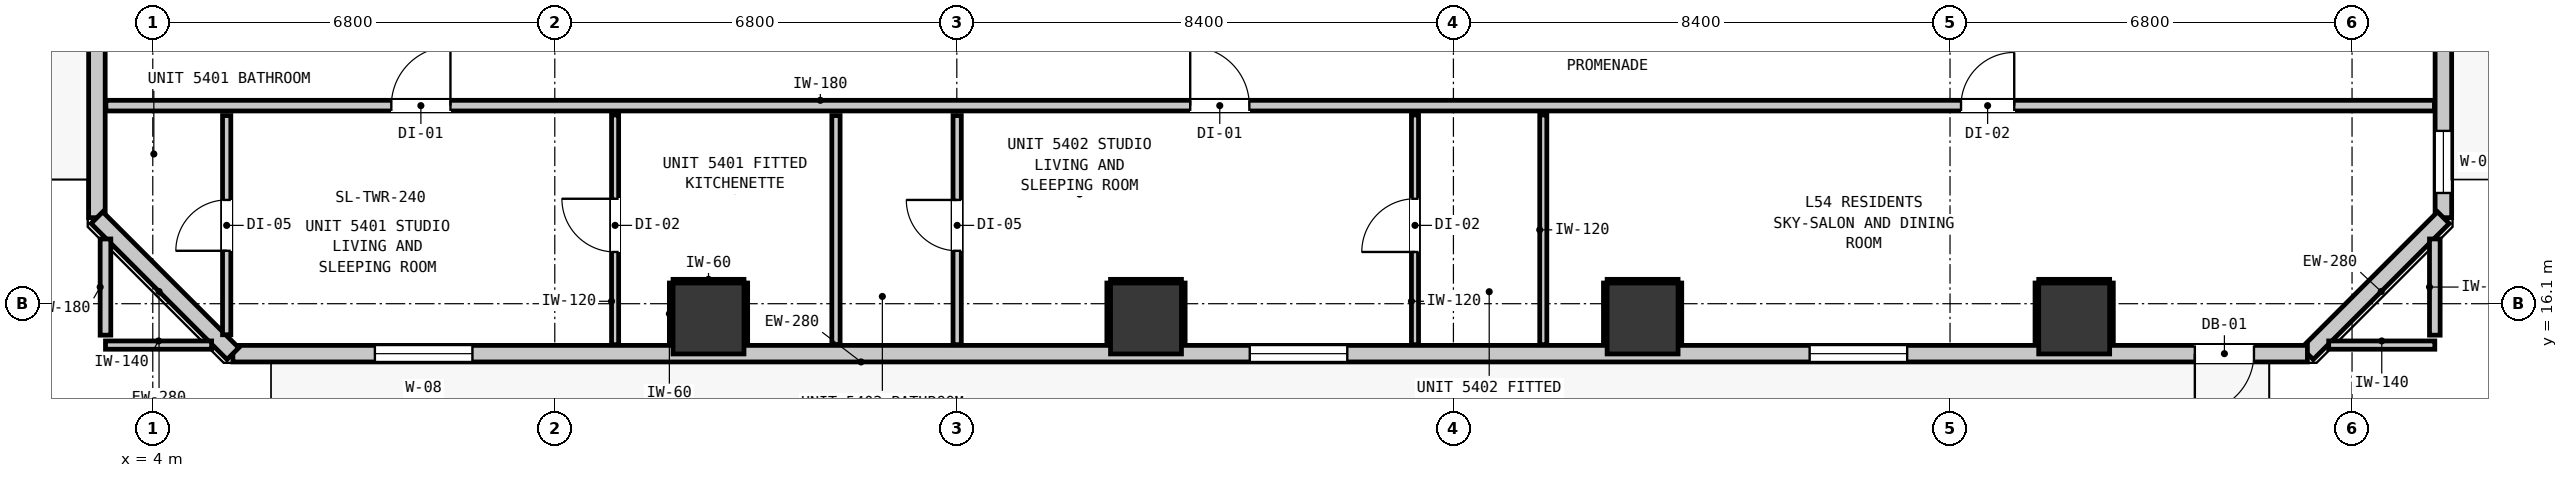
"""IFC4 building model, lengths in metres.
Left out: names, types, materials, properties, quantities, classifications, styles, units other than length and angle.
Written with IfcOpenShell. Run it as: python <this file> out.ifc"""

import sys

from ifc_helpers import new_model, si_unit, direction, frame, frame_2d, origin, origin_2d, place, context, subcontext, project, spatial, rectangle, extrude, element, fill, save


model = new_model("IFC4")
c1 = context("Model", 3, precision=1e-05, world=origin(), true_north=direction((0.0, 1.0)))
c2 = subcontext(c1, "Body", "Model", "MODEL_VIEW")
j1 = project(units=[si_unit("LENGTHUNIT", "METRE"), si_unit("PLANEANGLEUNIT", "RADIAN")], contexts=[c1])
p1 = place(None, origin())
s1 = spatial("IfcSite", under=j1, at=p1, CompositionType="ELEMENT")
p2 = place(p1, origin())
s2 = spatial("IfcBuilding", under=s1, at=p2, CompositionType="ELEMENT")
p3 = place(p2, frame((0.0, 0.0, 186.84)))
s3 = spatial("IfcBuildingStorey", under=s2, at=p3, CompositionType="ELEMENT", Elevation=186.84)
for number, where, z_axis, x_axis in (
    (1, (13.4, 15.85, 0.0), (0.0, 0.0, 1.0), (1.0, 0.0, 0.0)),
    (2, (20.8, 15.85, 0.0), (0.0, 0.0, 1.0), (1.0, 0.0, 0.0)),
    (3, (29.2, 15.85, 0.0), (0.0, 0.0, 1.0), (1.0, 0.0, 0.0)),
    (4, (36.5, 15.85, 0.0), (0.0, 0.0, 1.0), (1.0, 0.0, 0.0)),
):
    element("IfcColumn", number, at=place(p3, frame(where, z_axis=z_axis, x_axis=x_axis)), inside=s3, PredefinedType="COLUMN", context=c2, shape_type="SweptSolid", body=[
        extrude(rectangle(XDim=1.2, YDim=1.2, at=origin_2d()), origin(), (0.0, 0.0, 1.0), 2.9),
    ])
p4 = place(p3, frame((3.055, 17.555, 0.0), z_axis=(0.0, 0.0, 1.0), x_axis=(0.0, 1.0, 0.0)))
e5 = element("IfcWall", 5, at=p4, inside=s3, PredefinedType="STANDARD", context=c2, shape_type="SweptSolid", body=[
    extrude(rectangle(XDim=32.29, YDim=0.28, at=frame_2d((16.145, 0.0))), origin(), (0.0, 0.0, 1.0), 2.9),
])
p5 = place(p4, frame((5.467, 0.0, 0.0)))
e6 = element("IfcOpeningElement", 6, at=p5, cuts=e5, PredefinedType="OPENING", context=c2, shape_type="SweptSolid", body=[
    extrude(rectangle(XDim=1.0, YDim=2.15, at=frame_2d((0.5, 1.075))), frame((0.0, 0.15, 0.0), z_axis=(0.0, -1.0, 0.0), x_axis=(1.0, 0.0, 0.0)), (0.0, 0.0, 1.0), 0.3),
])
p6 = place(p4, frame((8.831, 0.0, 0.85)))
e7 = element("IfcOpeningElement", 7, at=p6, cuts=e5, PredefinedType="OPENING", context=c2, shape_type="SweptSolid", body=[
    extrude(rectangle(XDim=1.65, YDim=1.75, at=frame_2d((0.825, 0.875))), frame((0.0, 0.15, 0.0), z_axis=(0.0, -1.0, 0.0), x_axis=(1.0, 0.0, 0.0)), (0.0, 0.0, 1.0), 0.3),
])
p7 = place(p3, frame((42.745, 49.845, 0.0), z_axis=(0.0, 0.0, 1.0), x_axis=(0.0, -1.0, 0.0)))
e8 = element("IfcWall", 8, at=p7, inside=s3, PredefinedType="STANDARD", context=c2, shape_type="SweptSolid", body=[
    extrude(rectangle(XDim=32.29, YDim=0.28, at=frame_2d((16.145, 0.0))), origin(), (0.0, 0.0, 1.0), 2.9),
])
p8 = place(p7, frame((0.904, 0.0, 0.0)))
e9 = element("IfcOpeningElement", 9, at=p8, cuts=e8, PredefinedType="OPENING", context=c2, shape_type="SweptSolid", body=[
    extrude(rectangle(XDim=1.0, YDim=2.15, at=frame_2d((0.5, 1.075))), frame((0.0, 0.15, 0.0), z_axis=(0.0, -1.0, 0.0), x_axis=(1.0, 0.0, 0.0)), (0.0, 0.0, 1.0), 0.3),
])
p9 = place(p7, frame((30.822, 0.0, 0.85)))
e10 = element("IfcOpeningElement", 10, at=p9, cuts=e8, PredefinedType="OPENING", context=c2, shape_type="SweptSolid", body=[
    extrude(rectangle(XDim=1.05, YDim=1.65, at=frame_2d((0.525, 0.825))), frame((0.0, 0.15, 0.0), z_axis=(0.0, -1.0, 0.0), x_axis=(1.0, 0.0, 0.0)), (0.0, 0.0, 1.0), 0.3),
])
p10 = place(p7, frame((4.124, 0.0, 0.85)))
e11 = element("IfcOpeningElement", 11, at=p10, cuts=e8, PredefinedType="OPENING", context=c2, shape_type="SweptSolid", body=[
    extrude(rectangle(XDim=1.65, YDim=1.75, at=frame_2d((0.825, 0.875))), frame((0.0, 0.15, 0.0), z_axis=(0.0, -1.0, 0.0), x_axis=(1.0, 0.0, 0.0)), (0.0, 0.0, 1.0), 0.3),
])
p11 = place(p7, frame((24.424, 0.0, 0.85)))
e12 = element("IfcOpeningElement", 12, at=p11, cuts=e8, PredefinedType="OPENING", context=c2, shape_type="SweptSolid", body=[
    extrude(rectangle(XDim=1.65, YDim=1.75, at=frame_2d((0.825, 0.875))), frame((0.0, 0.15, 0.0), z_axis=(0.0, -1.0, 0.0), x_axis=(1.0, 0.0, 0.0)), (0.0, 0.0, 1.0), 0.3),
])
p12 = place(p3, frame((42.745, 17.555, 0.0), z_axis=(0.0, 0.0, 1.0), x_axis=(-0.707106781187, -0.707106781187, 0.0)))
e13 = element("IfcWall", 13, at=p12, inside=s3, PredefinedType="STANDARD", context=c2, shape_type="SweptSolid", body=[
    extrude(rectangle(XDim=3.253, YDim=0.28, at=frame_2d((1.626, 0.0))), origin(), (0.0, 0.0, 1.0), 2.9),
])
p13 = place(p3, frame((40.445, 15.255, 0.0), z_axis=(0.0, 0.0, 1.0), x_axis=(-1.0, 0.0, 0.0)))
e14 = element("IfcWall", 14, at=p13, inside=s3, PredefinedType="STANDARD", context=c2, shape_type="SweptSolid", body=[
    extrude(rectangle(XDim=35.09, YDim=0.28, at=frame_2d((17.545, 0.0))), origin(), (0.0, 0.0, 1.0), 2.9),
])
p14 = place(p13, frame((0.904, 0.0, 0.0)))
e15 = element("IfcOpeningElement", 15, at=p14, cuts=e14, PredefinedType="OPENING", context=c2, shape_type="SweptSolid", body=[
    extrude(rectangle(XDim=1.0, YDim=2.15, at=frame_2d((0.5, 1.075))), frame((0.0, 0.15, 0.0), z_axis=(0.0, -1.0, 0.0), x_axis=(1.0, 0.0, 0.0)), (0.0, 0.0, 1.0), 0.3),
])
p15 = place(p13, frame((31.038, 0.0, 0.85)))
e16 = element("IfcOpeningElement", 16, at=p15, cuts=e14, PredefinedType="OPENING", context=c2, shape_type="SweptSolid", body=[
    extrude(rectangle(XDim=1.65, YDim=1.75, at=frame_2d((0.825, 0.875))), frame((0.0, 0.15, 0.0), z_axis=(0.0, -1.0, 0.0), x_axis=(1.0, 0.0, 0.0)), (0.0, 0.0, 1.0), 0.3),
])
p16 = place(p13, frame((16.24, 0.0, 0.85)))
e17 = element("IfcOpeningElement", 17, at=p16, cuts=e14, PredefinedType="OPENING", context=c2, shape_type="SweptSolid", body=[
    extrude(rectangle(XDim=1.65, YDim=1.75, at=frame_2d((0.825, 0.875))), frame((0.0, 0.15, 0.0), z_axis=(0.0, -1.0, 0.0), x_axis=(1.0, 0.0, 0.0)), (0.0, 0.0, 1.0), 0.3),
])
p17 = place(p13, frame((6.77, 0.0, 0.85)))
e18 = element("IfcOpeningElement", 18, at=p17, cuts=e14, PredefinedType="OPENING", context=c2, shape_type="SweptSolid", body=[
    extrude(rectangle(XDim=1.65, YDim=1.75, at=frame_2d((0.825, 0.875))), frame((0.0, 0.15, 0.0), z_axis=(0.0, -1.0, 0.0), x_axis=(1.0, 0.0, 0.0)), (0.0, 0.0, 1.0), 0.3),
])
p18 = place(p3, frame((5.355, 15.255, 0.0), z_axis=(0.0, 0.0, 1.0), x_axis=(-0.707106781187, 0.707106781187, 0.0)))
e19 = element("IfcWall", 19, at=p18, inside=s3, PredefinedType="STANDARD", context=c2, shape_type="SweptSolid", body=[
    extrude(rectangle(XDim=3.253, YDim=0.28, at=frame_2d((1.626, 0.0))), origin(), (0.0, 0.0, 1.0), 2.9),
])
p19 = place(p3, frame((3.207, 19.45, 0.0), z_axis=(0.0, 0.0, 1.0), x_axis=(1.0, 0.0, 0.0)))
e20 = element("IfcWall", 20, at=p19, inside=s3, PredefinedType="PARTITIONING", context=c2, shape_type="SweptSolid", body=[
    extrude(rectangle(XDim=39.386, YDim=0.18, at=frame_2d((19.693, 0.0))), origin(), (0.0, 0.0, 1.0), 2.9),
])
p20 = place(p19, frame((4.828, 0.0, 0.0)))
e21 = element("IfcOpeningElement", 21, at=p20, cuts=e20, PredefinedType="OPENING", context=c2, shape_type="SweptSolid", body=[
    extrude(rectangle(XDim=1.0, YDim=2.15, at=frame_2d((0.5, 1.075))), frame((0.0, 0.1, 0.0), z_axis=(0.0, -1.0, 0.0), x_axis=(1.0, 0.0, 0.0)), (0.0, 0.0, 1.0), 0.2),
])
p21 = place(p19, frame((18.341, 0.0, 0.0)))
e22 = element("IfcOpeningElement", 22, at=p21, cuts=e20, PredefinedType="OPENING", context=c2, shape_type="SweptSolid", body=[
    extrude(rectangle(XDim=1.0, YDim=2.15, at=frame_2d((0.5, 1.075))), frame((0.0, 0.1, 0.0), z_axis=(0.0, -1.0, 0.0), x_axis=(1.0, 0.0, 0.0)), (0.0, 0.0, 1.0), 0.2),
])
p22 = place(p19, frame((31.379, 0.0, 0.0)))
e23 = element("IfcOpeningElement", 23, at=p22, cuts=e20, PredefinedType="OPENING", context=c2, shape_type="SweptSolid", body=[
    extrude(rectangle(XDim=0.9, YDim=2.1, at=frame_2d((0.45, 1.05))), frame((0.0, 0.1, 0.0), z_axis=(0.0, -1.0, 0.0), x_axis=(1.0, 0.0, 0.0)), (0.0, 0.0, 1.0), 0.2),
])
for number, where, z_axis, x_axis in (
    (24, (3.2, 15.4, 0.0), (0.0, 0.0, 1.0), (1.0, 0.0, 0.0)),
    (25, (40.805, 15.4, 0.0), (0.0, 0.0, 1.0), (1.0, 0.0, 0.0)),
):
    element("IfcWall", number, at=place(p3, frame(where, z_axis=z_axis, x_axis=x_axis)), inside=s3, PredefinedType="PARTITIONING", context=c2, shape_type="SweptSolid", body=[
        extrude(rectangle(XDim=1.795, YDim=0.14, at=frame_2d((0.897, 0.0))), origin(), (0.0, 0.0, 1.0), 2.9),
    ])
for number, where, z_axis, x_axis in (
    (26, (3.2, 15.568, 0.0), (0.0, 0.0, 1.0), (0.0, 1.0, 0.0)),
    (27, (42.6, 15.568, 0.0), (0.0, 0.0, 1.0), (0.0, 1.0, 0.0)),
):
    element("IfcWall", number, at=place(p3, frame(where, z_axis=z_axis, x_axis=x_axis)), inside=s3, PredefinedType="PARTITIONING", context=c2, shape_type="SweptSolid", body=[
        extrude(rectangle(XDim=1.627, YDim=0.18, at=frame_2d((0.813, 0.0))), origin(), (0.0, 0.0, 1.0), 2.9),
    ])
p23 = place(p3, frame((5.25, 15.575, 0.0), z_axis=(0.0, 0.0, 1.0), x_axis=(0.0, 1.0, 0.0)))
e28 = element("IfcWall", 28, at=p23, inside=s3, PredefinedType="PARTITIONING", context=c2, shape_type="SweptSolid", body=[
    extrude(rectangle(XDim=3.707, YDim=0.14, at=frame_2d((1.854, 0.0))), origin(), (0.0, 0.0, 1.0), 2.9),
])
p24 = place(p23, frame((1.42, 0.0, 0.0)))
e29 = element("IfcOpeningElement", 29, at=p24, cuts=e28, PredefinedType="OPENING", context=c2, shape_type="SweptSolid", body=[
    extrude(rectangle(XDim=0.86, YDim=2.02, at=frame_2d((0.43, 1.01))), frame((0.0, 0.08, 0.0), z_axis=(0.0, -1.0, 0.0), x_axis=(1.0, 0.0, 0.0)), (0.0, 0.0, 1.0), 0.16),
])
p25 = place(p3, frame((15.556, 15.407, 0.0), z_axis=(0.0, 0.0, 1.0), x_axis=(0.0, 1.0, 0.0)))
e30 = element("IfcWall", 30, at=p25, inside=s3, PredefinedType="PARTITIONING", context=c2, shape_type="SweptSolid", body=[
    extrude(rectangle(XDim=3.875, YDim=0.14, at=frame_2d((1.938, 0.0))), origin(), (0.0, 0.0, 1.0), 2.9),
])
p26 = place(p3, frame((17.606, 15.407, 0.0), z_axis=(0.0, 0.0, 1.0), x_axis=(0.0, 1.0, 0.0)))
e31 = element("IfcWall", 31, at=p26, inside=s3, PredefinedType="PARTITIONING", context=c2, shape_type="SweptSolid", body=[
    extrude(rectangle(XDim=3.875, YDim=0.14, at=frame_2d((1.938, 0.0))), origin(), (0.0, 0.0, 1.0), 2.9),
])
p27 = place(p26, frame((1.588, 0.0, 0.0)))
e32 = element("IfcOpeningElement", 32, at=p27, cuts=e31, PredefinedType="OPENING", context=c2, shape_type="SweptSolid", body=[
    extrude(rectangle(XDim=0.86, YDim=2.02, at=frame_2d((0.43, 1.01))), frame((0.0, 0.08, 0.0), z_axis=(0.0, -1.0, 0.0), x_axis=(1.0, 0.0, 0.0)), (0.0, 0.0, 1.0), 0.16),
])
p28 = place(p3, frame((11.82, 15.407, 0.0), z_axis=(0.0, 0.0, 1.0), x_axis=(0.0, 1.0, 0.0)))
e33 = element("IfcWall", 33, at=p28, inside=s3, PredefinedType="PARTITIONING", context=c2, shape_type="SweptSolid", body=[
    extrude(rectangle(XDim=3.885, YDim=0.12, at=frame_2d((1.942, 0.0))), origin(), (0.0, 0.0, 1.0), 2.9),
])
p29 = place(p28, frame((1.568, 0.0, 0.0)))
e34 = element("IfcOpeningElement", 34, at=p29, cuts=e33, PredefinedType="OPENING", context=c2, shape_type="SweptSolid", body=[
    extrude(rectangle(XDim=0.9, YDim=2.1, at=frame_2d((0.45, 1.05))), frame((0.0, 0.07, 0.0), z_axis=(0.0, -1.0, 0.0), x_axis=(1.0, 0.0, 0.0)), (0.0, 0.0, 1.0), 0.14),
])
p30 = place(p3, frame((25.35, 15.407, 0.0), z_axis=(0.0, 0.0, 1.0), x_axis=(0.0, 1.0, 0.0)))
e35 = element("IfcWall", 35, at=p30, inside=s3, PredefinedType="PARTITIONING", context=c2, shape_type="SweptSolid", body=[
    extrude(rectangle(XDim=3.885, YDim=0.12, at=frame_2d((1.942, 0.0))), origin(), (0.0, 0.0, 1.0), 2.9),
])
p31 = place(p30, frame((1.568, 0.0, 0.0)))
e36 = element("IfcOpeningElement", 36, at=p31, cuts=e35, PredefinedType="OPENING", context=c2, shape_type="SweptSolid", body=[
    extrude(rectangle(XDim=0.9, YDim=2.1, at=frame_2d((0.45, 1.05))), frame((0.0, 0.07, 0.0), z_axis=(0.0, -1.0, 0.0), x_axis=(1.0, 0.0, 0.0)), (0.0, 0.0, 1.0), 0.14),
])
p32 = place(p3, frame((27.52, 15.407, 0.0), z_axis=(0.0, 0.0, 1.0), x_axis=(0.0, 1.0, 0.0)))
e37 = element("IfcWall", 37, at=p32, inside=s3, PredefinedType="PARTITIONING", context=c2, shape_type="SweptSolid", body=[
    extrude(rectangle(XDim=3.885, YDim=0.12, at=frame_2d((1.942, 0.0))), origin(), (0.0, 0.0, 1.0), 2.9),
])
p33 = place(p3, frame((12.8, 16.482, 0.0), z_axis=(0.0, 0.0, 1.0), x_axis=(1.0, 0.0, 0.0)))
e38 = element("IfcWall", 38, at=p33, inside=s3, PredefinedType="PARTITIONING", context=c2, shape_type="SweptSolid", body=[
    extrude(rectangle(XDim=1.2, YDim=0.06, at=frame_2d((0.6, 0.0))), origin(), (0.0, 0.0, 1.0), 1.45),
])
for number, where, z_axis, x_axis in (
    (39, (12.768, 15.41, 0.0), (0.0, 0.0, 1.0), (0.0, 1.0, 0.0)),
    (40, (14.032, 15.41, 0.0), (0.0, 0.0, 1.0), (0.0, 1.0, 0.0)),
):
    element("IfcWall", number, at=place(p3, frame(where, z_axis=z_axis, x_axis=x_axis)), inside=s3, PredefinedType="PARTITIONING", context=c2, shape_type="SweptSolid", body=[
        extrude(rectangle(XDim=1.04, YDim=0.06, at=frame_2d((0.52, 0.0))), origin(), (0.0, 0.0, 1.0), 0.905),
    ])
p34 = place(p3, frame((20.2, 16.482, 0.0), z_axis=(0.0, 0.0, 1.0), x_axis=(1.0, 0.0, 0.0)))
e41 = element("IfcWall", 41, at=p34, inside=s3, PredefinedType="PARTITIONING", context=c2, shape_type="SweptSolid", body=[
    extrude(rectangle(XDim=1.2, YDim=0.06, at=frame_2d((0.6, 0.0))), origin(), (0.0, 0.0, 1.0), 1.45),
])
for number, where, z_axis, x_axis in (
    (42, (20.168, 15.41, 0.0), (0.0, 0.0, 1.0), (0.0, 1.0, 0.0)),
    (43, (21.432, 15.41, 0.0), (0.0, 0.0, 1.0), (0.0, 1.0, 0.0)),
):
    element("IfcWall", number, at=place(p3, frame(where, z_axis=z_axis, x_axis=x_axis)), inside=s3, PredefinedType="PARTITIONING", context=c2, shape_type="SweptSolid", body=[
        extrude(rectangle(XDim=1.04, YDim=0.06, at=frame_2d((0.52, 0.0))), origin(), (0.0, 0.0, 1.0), 0.905),
    ])
p35 = place(p3, frame((28.6, 16.482, 0.0), z_axis=(0.0, 0.0, 1.0), x_axis=(1.0, 0.0, 0.0)))
e44 = element("IfcWall", 44, at=p35, inside=s3, PredefinedType="PARTITIONING", context=c2, shape_type="SweptSolid", body=[
    extrude(rectangle(XDim=1.2, YDim=0.06, at=frame_2d((0.6, 0.0))), origin(), (0.0, 0.0, 1.0), 1.45),
])
for number, where, z_axis, x_axis in (
    (45, (28.568, 15.41, 0.0), (0.0, 0.0, 1.0), (0.0, 1.0, 0.0)),
    (46, (29.832, 15.41, 0.0), (0.0, 0.0, 1.0), (0.0, 1.0, 0.0)),
):
    element("IfcWall", number, at=place(p3, frame(where, z_axis=z_axis, x_axis=x_axis)), inside=s3, PredefinedType="PARTITIONING", context=c2, shape_type="SweptSolid", body=[
        extrude(rectangle(XDim=1.04, YDim=0.06, at=frame_2d((0.52, 0.0))), origin(), (0.0, 0.0, 1.0), 0.905),
    ])
p36 = place(p3, frame((35.9, 16.482, 0.0), z_axis=(0.0, 0.0, 1.0), x_axis=(1.0, 0.0, 0.0)))
e47 = element("IfcWall", 47, at=p36, inside=s3, PredefinedType="PARTITIONING", context=c2, shape_type="SweptSolid", body=[
    extrude(rectangle(XDim=1.2, YDim=0.06, at=frame_2d((0.6, 0.0))), origin(), (0.0, 0.0, 1.0), 1.45),
])
for number, where, z_axis, x_axis in (
    (48, (35.868, 15.41, 0.0), (0.0, 0.0, 1.0), (0.0, 1.0, 0.0)),
    (49, (37.132, 15.41, 0.0), (0.0, 0.0, 1.0), (0.0, 1.0, 0.0)),
):
    element("IfcWall", number, at=place(p3, frame(where, z_axis=z_axis, x_axis=x_axis)), inside=s3, PredefinedType="PARTITIONING", context=c2, shape_type="SweptSolid", body=[
        extrude(rectangle(XDim=1.04, YDim=0.06, at=frame_2d((0.52, 0.0))), origin(), (0.0, 0.0, 1.0), 0.905),
    ])
p37 = place(p14, origin())
e50 = element("IfcDoor", 50, at=p37, inside=s3, OperationType="SINGLE_SWING_RIGHT", PredefinedType="DOOR", context=c2, shape_type="SweptSolid", body=[
    extrude(rectangle(XDim=1.0, YDim=2.15, at=frame_2d((0.5, 1.075))), frame((0.0, 0.025, 0.0), z_axis=(0.0, -1.0, 0.0), x_axis=(1.0, 0.0, 0.0)), (0.0, 0.0, 1.0), 0.05),
])
fill(e15, e50)
p38 = place(p9, origin())
e51 = element("IfcWindow", 51, at=p38, inside=s3, PartitioningType="SINGLE_PANEL", PredefinedType="WINDOW", context=c2, shape_type="SweptSolid", body=[
    extrude(rectangle(XDim=1.05, YDim=1.65, at=frame_2d((0.525, 0.825))), frame((0.0, 0.03, 0.0), z_axis=(0.0, -1.0, 0.0), x_axis=(1.0, 0.0, 0.0)), (0.0, 0.0, 1.0), 0.06),
])
fill(e10, e51)
p39 = place(p15, origin())
e52 = element("IfcWindow", 52, at=p39, inside=s3, PartitioningType="SINGLE_PANEL", PredefinedType="WINDOW", context=c2, shape_type="SweptSolid", body=[
    extrude(rectangle(XDim=1.65, YDim=1.75, at=frame_2d((0.825, 0.875))), frame((0.0, 0.03, 0.0), z_axis=(0.0, -1.0, 0.0), x_axis=(1.0, 0.0, 0.0)), (0.0, 0.0, 1.0), 0.06),
])
fill(e16, e52)
p40 = place(p16, origin())
e53 = element("IfcWindow", 53, at=p40, inside=s3, PartitioningType="SINGLE_PANEL", PredefinedType="WINDOW", context=c2, shape_type="SweptSolid", body=[
    extrude(rectangle(XDim=1.65, YDim=1.75, at=frame_2d((0.825, 0.875))), frame((0.0, 0.03, 0.0), z_axis=(0.0, -1.0, 0.0), x_axis=(1.0, 0.0, 0.0)), (0.0, 0.0, 1.0), 0.06),
])
fill(e17, e53)
p41 = place(p17, origin())
e54 = element("IfcWindow", 54, at=p41, inside=s3, PartitioningType="SINGLE_PANEL", PredefinedType="WINDOW", context=c2, shape_type="SweptSolid", body=[
    extrude(rectangle(XDim=1.65, YDim=1.75, at=frame_2d((0.825, 0.875))), frame((0.0, 0.03, 0.0), z_axis=(0.0, -1.0, 0.0), x_axis=(1.0, 0.0, 0.0)), (0.0, 0.0, 1.0), 0.06),
])
fill(e18, e54)
p42 = place(p20, origin())
e55 = element("IfcDoor", 55, at=p42, inside=s3, OperationType="SINGLE_SWING_RIGHT", PredefinedType="DOOR", context=c2, shape_type="SweptSolid", body=[
    extrude(rectangle(XDim=1.0, YDim=2.15, at=frame_2d((0.5, 1.075))), frame((0.0, 0.025, 0.0), z_axis=(0.0, -1.0, 0.0), x_axis=(1.0, 0.0, 0.0)), (0.0, 0.0, 1.0), 0.05),
])
fill(e21, e55)
p43 = place(p24, origin())
e56 = element("IfcDoor", 56, at=p43, inside=s3, OperationType="SINGLE_SWING_LEFT", PredefinedType="DOOR", context=c2, shape_type="SweptSolid", body=[
    extrude(rectangle(XDim=0.86, YDim=2.02, at=frame_2d((0.43, 1.01))), frame((0.0, 0.025, 0.0), z_axis=(0.0, -1.0, 0.0), x_axis=(1.0, 0.0, 0.0)), (0.0, 0.0, 1.0), 0.05),
])
fill(e29, e56)
p44 = place(p29, origin())
e57 = element("IfcDoor", 57, at=p44, inside=s3, OperationType="SINGLE_SWING_RIGHT", PredefinedType="DOOR", context=c2, shape_type="SweptSolid", body=[
    extrude(rectangle(XDim=0.9, YDim=2.1, at=frame_2d((0.45, 1.05))), frame((0.0, 0.025, 0.0), z_axis=(0.0, -1.0, 0.0), x_axis=(1.0, 0.0, 0.0)), (0.0, 0.0, 1.0), 0.05),
])
fill(e34, e57)
p45 = place(p21, origin())
e58 = element("IfcDoor", 58, at=p45, inside=s3, OperationType="SINGLE_SWING_LEFT", PredefinedType="DOOR", context=c2, shape_type="SweptSolid", body=[
    extrude(rectangle(XDim=1.0, YDim=2.15, at=frame_2d((0.5, 1.075))), frame((0.0, 0.025, 0.0), z_axis=(0.0, -1.0, 0.0), x_axis=(1.0, 0.0, 0.0)), (0.0, 0.0, 1.0), 0.05),
])
fill(e22, e58)
p46 = place(p27, origin())
e59 = element("IfcDoor", 59, at=p46, inside=s3, OperationType="SINGLE_SWING_RIGHT", PredefinedType="DOOR", context=c2, shape_type="SweptSolid", body=[
    extrude(rectangle(XDim=0.86, YDim=2.02, at=frame_2d((0.43, 1.01))), frame((0.0, 0.025, 0.0), z_axis=(0.0, -1.0, 0.0), x_axis=(1.0, 0.0, 0.0)), (0.0, 0.0, 1.0), 0.05),
])
fill(e32, e59)
p47 = place(p31, origin())
e60 = element("IfcDoor", 60, at=p47, inside=s3, OperationType="SINGLE_SWING_LEFT", PredefinedType="DOOR", context=c2, shape_type="SweptSolid", body=[
    extrude(rectangle(XDim=0.9, YDim=2.1, at=frame_2d((0.45, 1.05))), frame((0.0, 0.025, 0.0), z_axis=(0.0, -1.0, 0.0), x_axis=(1.0, 0.0, 0.0)), (0.0, 0.0, 1.0), 0.05),
])
fill(e36, e60)
p48 = place(p22, origin())
e61 = element("IfcDoor", 61, at=p48, inside=s3, OperationType="SINGLE_SWING_RIGHT", PredefinedType="DOOR", context=c2, shape_type="SweptSolid", body=[
    extrude(rectangle(XDim=0.9, YDim=2.1, at=frame_2d((0.45, 1.05))), frame((0.0, 0.025, 0.0), z_axis=(0.0, -1.0, 0.0), x_axis=(1.0, 0.0, 0.0)), (0.0, 0.0, 1.0), 0.05),
])
fill(e23, e61)
save(model, sys.argv[1])
